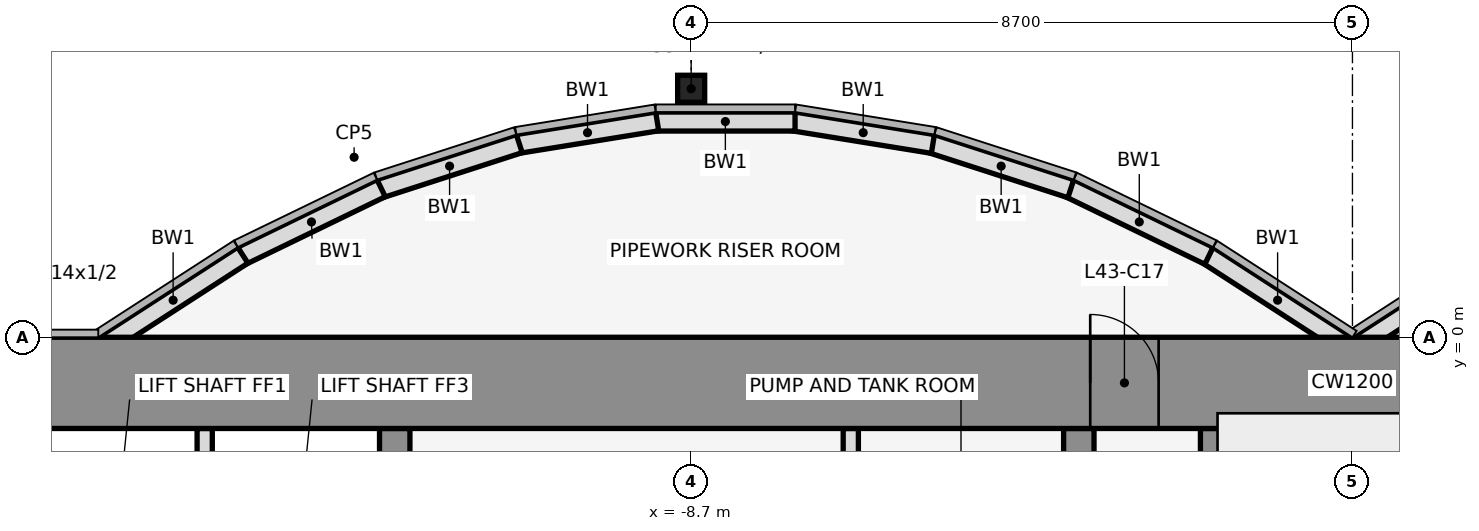
"""IFC4 building model, lengths in metres.
Left out: names, types, materials, properties, quantities, classifications, styles, units other than length and angle.
Written with IfcOpenShell. Run it as: python <this file> out.ifc"""

import sys

from ifc_helpers import new_model, si_unit, direction, frame, frame_2d, origin, origin_2d, place, context, subcontext, project, spatial, rectangle, hollow_rectangle, extrude, element, fill, save


model = new_model("IFC4")
c1 = context("Model", 3, precision=1e-05, world=origin(), true_north=direction((0.0, 1.0)))
c2 = subcontext(c1, "Body", "Model", "MODEL_VIEW")
j1 = project(units=[si_unit("LENGTHUNIT", "METRE"), si_unit("PLANEANGLEUNIT", "RADIAN")], contexts=[c1])
p1 = place(None, origin())
s1 = spatial("IfcSite", under=j1, at=p1, CompositionType="ELEMENT")
p2 = place(p1, origin())
s2 = spatial("IfcBuilding", under=s1, at=p2, CompositionType="ELEMENT")
p3 = place(p2, frame((0.0, 0.0, 195.0)))
s3 = spatial("IfcBuildingStorey", under=s2, at=p3, CompositionType="ELEMENT", Elevation=195.0)
p4 = place(p3, frame((-8.7, 3.269, 0.0), z_axis=(0.0, 0.0, 1.0), x_axis=(1.0, 0.0, 0.0)))
e1 = element("IfcColumn", 1, at=p4, inside=s3, PredefinedType="COLUMN", context=c2, shape_type="SweptSolid", body=[
    extrude(hollow_rectangle(XDim=0.356, YDim=0.356, WallThickness=0.012, at=origin_2d()), origin(), (0.0, 0.0, 1.0), 4.1),
])
for number, where, z_axis, x_axis in (
    (2, (1.901, 1.08, 0.0), (0.0, 0.0, 1.0), (-0.84, -0.543, 0.0)),
    (3, (-0.068, -0.105, 0.0), (0.0, 0.0, 1.0), (-0.84, 0.543, 0.0)),
):
    element("IfcWall", number, at=place(p3, frame(where, z_axis=z_axis, x_axis=x_axis)), inside=s3, PredefinedType="STANDARD", context=c2, shape_type="SweptSolid", body=[
        extrude(rectangle(XDim=2.183, YDim=0.25, at=frame_2d((1.091, 0.0))), origin(), (0.0, 0.0, 1.0), 3.95),
    ])
p5 = place(p3, frame((-1.888, 1.073, 0.0), z_axis=(0.0, 0.0, 1.0), x_axis=(-0.89982408427, 0.436252928206, 0.0)))
e4 = element("IfcWall", 4, at=p5, inside=s3, PredefinedType="STANDARD", context=c2, shape_type="SweptSolid", body=[
    extrude(rectangle(XDim=2.038, YDim=0.25, at=frame_2d((1.019, 0.0))), origin(), (0.0, 0.0, 1.0), 3.95),
])
p6 = place(p3, frame((-3.705, 1.955, 0.0), z_axis=(0.0, 0.0, 1.0), x_axis=(-0.951495806175, 0.307661714928, 0.0)))
e5 = element("IfcWall", 5, at=p6, inside=s3, PredefinedType="STANDARD", context=c2, shape_type="SweptSolid", body=[
    extrude(rectangle(XDim=1.927, YDim=0.25, at=frame_2d((0.963, 0.0))), origin(), (0.0, 0.0, 1.0), 3.95),
])
p7 = place(p3, frame((-5.52, 2.543, 0.0), z_axis=(0.0, 0.0, 1.0), x_axis=(-0.987181718931, 0.159600293885, 0.0)))
e6 = element("IfcWall", 6, at=p7, inside=s3, PredefinedType="STANDARD", context=c2, shape_type="SweptSolid", body=[
    extrude(rectangle(XDim=1.857, YDim=0.25, at=frame_2d((0.929, 0.0))), origin(), (0.0, 0.0, 1.0), 3.95),
])
p8 = place(p3, frame((-7.333, 2.838, 0.0), z_axis=(0.0, 0.0, 1.0), x_axis=(-1.0, 0.0, 0.0)))
e7 = element("IfcWall", 7, at=p8, inside=s3, PredefinedType="STANDARD", context=c2, shape_type="SweptSolid", body=[
    extrude(rectangle(XDim=1.833, YDim=0.25, at=frame_2d((0.917, 0.0))), origin(), (0.0, 0.0, 1.0), 3.95),
])
p9 = place(p3, frame((-9.147, 2.84, 0.0), z_axis=(0.0, 0.0, 1.0), x_axis=(-0.987181718931, -0.159600293885, 0.0)))
e8 = element("IfcWall", 8, at=p9, inside=s3, PredefinedType="STANDARD", context=c2, shape_type="SweptSolid", body=[
    extrude(rectangle(XDim=1.857, YDim=0.25, at=frame_2d((0.929, 0.0))), origin(), (0.0, 0.0, 1.0), 3.95),
])
p10 = place(p3, frame((-10.962, 2.548, 0.0), z_axis=(0.0, 0.0, 1.0), x_axis=(-0.951495806175, -0.307661714928, 0.0)))
e9 = element("IfcWall", 9, at=p10, inside=s3, PredefinedType="STANDARD", context=c2, shape_type="SweptSolid", body=[
    extrude(rectangle(XDim=1.927, YDim=0.25, at=frame_2d((0.963, 0.0))), origin(), (0.0, 0.0, 1.0), 3.95),
])
p11 = place(p3, frame((-12.779, 1.962, 0.0), z_axis=(0.0, 0.0, 1.0), x_axis=(-0.89982408427, -0.436252928206, 0.0)))
e10 = element("IfcWall", 10, at=p11, inside=s3, PredefinedType="STANDARD", context=c2, shape_type="SweptSolid", body=[
    extrude(rectangle(XDim=2.038, YDim=0.25, at=frame_2d((1.019, 0.0))), origin(), (0.0, 0.0, 1.0), 3.95),
])
p12 = place(p3, frame((-14.599, 1.08, 0.0), z_axis=(0.0, 0.0, 1.0), x_axis=(-0.83981312244, -0.542875602121, 0.0)))
e11 = element("IfcWall", 11, at=p12, inside=s3, PredefinedType="STANDARD", context=c2, shape_type="SweptSolid", body=[
    extrude(rectangle(XDim=2.183, YDim=0.25, at=frame_2d((1.091, 0.0))), origin(), (0.0, 0.0, 1.0), 3.95),
])
p13 = place(p3, frame((-15.1, -4.6, 0.0), z_axis=(0.0, 0.0, 1.0), x_axis=(0.0, 1.0, 0.0)))
e12 = element("IfcWall", 12, at=p13, inside=s3, PredefinedType="PARTITIONING", context=c2, shape_type="SweptSolid", body=[
    extrude(rectangle(XDim=3.4, YDim=0.2, at=frame_2d((1.7, 0.0))), origin(), (0.0, 0.0, 1.0), 2.84),
])
p14 = place(p3, frame((-12.6, -11.8, 0.0), z_axis=(0.0, 0.0, 1.0), x_axis=(0.0, 1.0, 0.0)))
e13 = element("IfcWall", 13, at=p14, inside=s3, PredefinedType="SHEAR", context=c2, shape_type="SweptSolid", body=[
    extrude(rectangle(XDim=10.6, YDim=0.4, at=frame_2d((5.3, 0.0))), origin(), (0.0, 0.0, 1.0), 4.1),
])
p15 = place(p14, frame((4.75, 0.0, 0.0)))
e14 = element("IfcOpeningElement", 14, at=p15, cuts=e13, PredefinedType="OPENING", context=c2, shape_type="SweptSolid", body=[
    extrude(rectangle(XDim=1.1, YDim=2.1, at=frame_2d((0.55, 1.05))), frame((0.0, 0.212, 0.0), z_axis=(0.0, -1.0, 0.0), x_axis=(1.0, 0.0, 0.0)), (0.0, 0.0, 1.0), 0.424),
])
p16 = place(p3, frame((-6.6, -4.6, 0.0), z_axis=(0.0, 0.0, 1.0), x_axis=(0.0, 1.0, 0.0)))
e15 = element("IfcWall", 15, at=p16, inside=s3, PredefinedType="PARTITIONING", context=c2, shape_type="SweptSolid", body=[
    extrude(rectangle(XDim=3.4, YDim=0.2, at=frame_2d((1.7, 0.0))), origin(), (0.0, 0.0, 1.0), 2.84),
])
p17 = place(p3, frame((-3.6, -11.8, 0.0), z_axis=(0.0, 0.0, 1.0), x_axis=(0.0, 1.0, 0.0)))
e16 = element("IfcWall", 16, at=p17, inside=s3, PredefinedType="SHEAR", context=c2, shape_type="SweptSolid", body=[
    extrude(rectangle(XDim=10.6, YDim=0.4, at=frame_2d((5.3, 0.0))), origin(), (0.0, 0.0, 1.0), 4.1),
])
p18 = place(p17, frame((4.85, 0.0, 0.0)))
e17 = element("IfcOpeningElement", 17, at=p18, cuts=e16, PredefinedType="OPENING", context=c2, shape_type="SweptSolid", body=[
    extrude(rectangle(XDim=0.9, YDim=2.1, at=frame_2d((0.45, 1.05))), frame((0.0, 0.212, 0.0), z_axis=(0.0, -1.0, 0.0), x_axis=(1.0, 0.0, 0.0)), (0.0, 0.0, 1.0), 0.424),
])
p19 = place(p3, frame((-1.8, -11.8, 0.0), z_axis=(0.0, 0.0, 1.0), x_axis=(0.0, 1.0, 0.0)))
e18 = element("IfcWall", 18, at=p19, inside=s3, PredefinedType="SHEAR", context=c2, shape_type="SweptSolid", body=[
    extrude(rectangle(XDim=10.6, YDim=0.4, at=frame_2d((5.3, 0.0))), origin(), (0.0, 0.0, 1.0), 4.1),
])
p20 = place(p3, frame((-22.0, -0.6, 0.0), z_axis=(0.0, 0.0, 1.0), x_axis=(1.0, 0.0, 0.0)))
e19 = element("IfcWall", 19, at=p20, inside=s3, PredefinedType="SHEAR", context=c2, shape_type="SweptSolid", body=[
    extrude(rectangle(XDim=44.0, YDim=1.2, at=frame_2d((22.0, 0.0))), origin(), (0.0, 0.0, 1.0), 4.1),
])
p21 = place(p20, frame((18.55, 0.0, 0.0)))
e20 = element("IfcOpeningElement", 20, at=p21, cuts=e19, PredefinedType="OPENING", context=c2, shape_type="SweptSolid", body=[
    extrude(rectangle(XDim=0.9, YDim=2.1, at=frame_2d((0.45, 1.05))), frame((0.0, 0.612, 0.0), z_axis=(0.0, -1.0, 0.0), x_axis=(1.0, 0.0, 0.0)), (0.0, 0.0, 1.0), 1.224),
])
p22 = place(p20, frame((24.55, 0.0, 0.0)))
e21 = element("IfcOpeningElement", 21, at=p22, cuts=e19, PredefinedType="OPENING", context=c2, shape_type="SweptSolid", body=[
    extrude(rectangle(XDim=0.9, YDim=2.1, at=frame_2d((0.45, 1.05))), frame((0.0, 0.612, 0.0), z_axis=(0.0, -1.0, 0.0), x_axis=(1.0, 0.0, 0.0)), (0.0, 0.0, 1.0), 1.224),
])
p23 = place(p21, origin())
e22 = element("IfcDoor", 22, at=p23, inside=s3, OperationType="SINGLE_SWING_LEFT", PredefinedType="DOOR", context=c2, shape_type="SweptSolid", body=[
    extrude(rectangle(XDim=0.9, YDim=2.1, at=frame_2d((0.45, 1.05))), frame((0.0, 0.025, 0.0), z_axis=(0.0, -1.0, 0.0), x_axis=(1.0, 0.0, 0.0)), (0.0, 0.0, 1.0), 0.05),
])
fill(e20, e22)
save(model, sys.argv[1])
